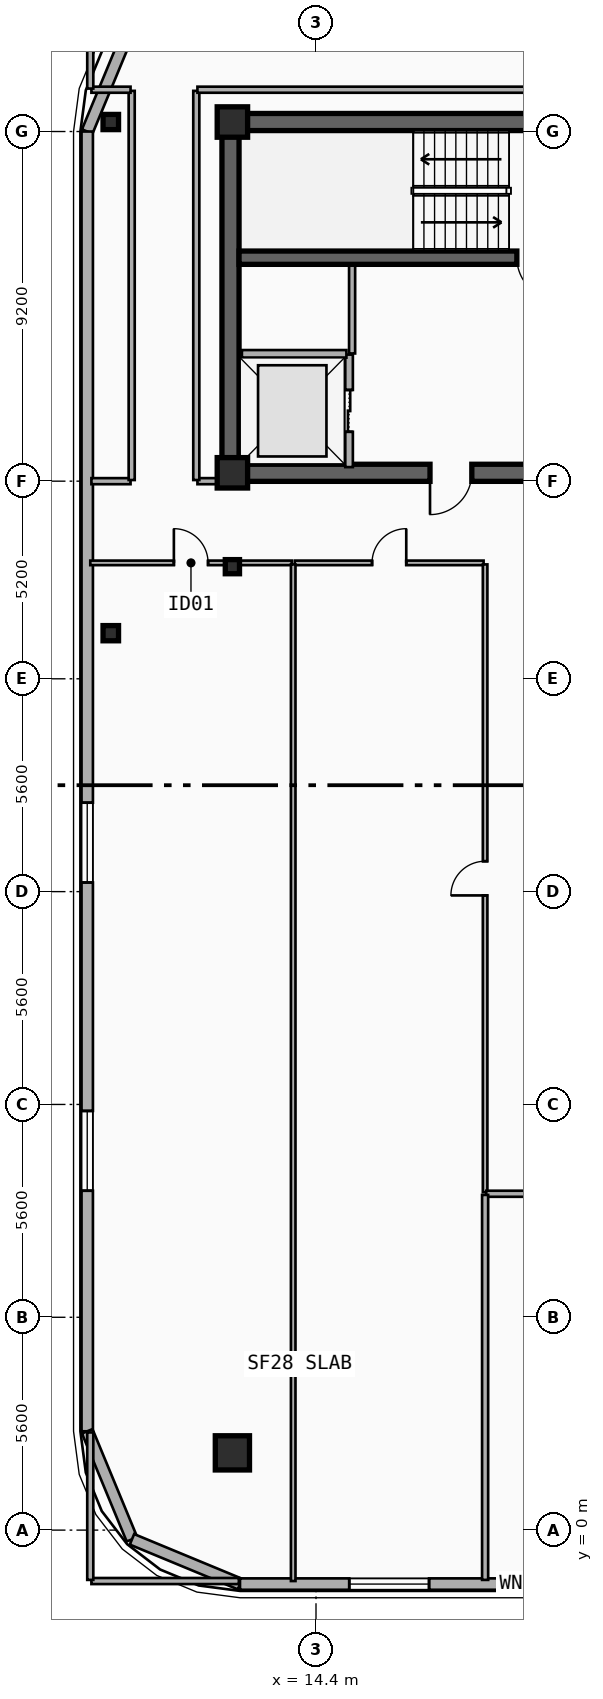
"""IFC4 building model, lengths in metres.
Left out: names, types, materials, properties, quantities, classifications, styles, units other than length and angle.
Written with IfcOpenShell. Run it as: python <this file> out.ifc"""

import sys

from ifc_helpers import new_model, si_unit, direction, frame, frame_2d, origin, origin_2d, place, context, subcontext, project, spatial, rectangle, i_section, extrude, element, fill, save


model = new_model("IFC4")
c1 = context("Model", 3, precision=1e-05, world=origin(), true_north=direction((0.0, 1.0)))
c2 = subcontext(c1, "Body", "Model", "MODEL_VIEW")
j1 = project(units=[si_unit("LENGTHUNIT", "METRE"), si_unit("PLANEANGLEUNIT", "RADIAN")], contexts=[c1])
p1 = place(None, origin())
s1 = spatial("IfcSite", under=j1, at=p1, CompositionType="ELEMENT")
p2 = place(p1, origin())
s2 = spatial("IfcBuilding", under=s1, at=p2, CompositionType="ELEMENT")
p3 = place(p2, frame((0.0, 0.0, 265.8)))
s3 = spatial("IfcBuildingStorey", under=s2, at=p3, CompositionType="ELEMENT", Elevation=265.8)
p4 = place(p3, frame((12.15, 37.05, 0.0), z_axis=(0.0, 0.0, 1.0), x_axis=(1.0, 0.0, 0.0)))
e1 = element("IfcWall", 1, at=p4, inside=s3, PredefinedType="SHEAR", context=c2, shape_type="SweptSolid", body=[
    extrude(rectangle(XDim=33.23, YDim=0.45, at=frame_2d((16.615, 0.0))), origin(), (0.0, 0.0, 1.0), 3.7),
])
p5 = place(p3, frame((21.18, 27.82, 0.0), z_axis=(0.0, 0.0, 1.0), x_axis=(-1.0, 0.0, 0.0)))
e2 = element("IfcWall", 2, at=p5, inside=s3, PredefinedType="SHEAR", context=c2, shape_type="SweptSolid", body=[
    extrude(rectangle(XDim=9.03, YDim=0.45, at=frame_2d((4.515, 0.0))), origin(), (0.0, 0.0, 1.0), 3.7),
])
p6 = place(p5, frame((2.68, 0.0, 0.0)))
e3 = element("IfcOpeningElement", 3, at=p6, cuts=e2, PredefinedType="OPENING", context=c2, shape_type="SweptSolid", body=[
    extrude(rectangle(XDim=1.1, YDim=2.15, at=frame_2d((0.55, 1.075))), frame((0.0, 0.235, 0.0), z_axis=(0.0, -1.0, 0.0), x_axis=(1.0, 0.0, 0.0)), (0.0, 0.0, 1.0), 0.47),
])
p7 = place(p3, frame((12.15, 28.045, 0.0), z_axis=(0.0, 0.0, 1.0), x_axis=(0.0, 1.0, 0.0)))
e4 = element("IfcWall", 4, at=p7, inside=s3, PredefinedType="SHEAR", context=c2, shape_type="SweptSolid", body=[
    extrude(rectangle(XDim=8.78, YDim=0.45, at=frame_2d((4.39, 0.0))), origin(), (0.0, 0.0, 1.0), 3.7),
])
p8 = place(p3, frame((21.005, 33.48, 0.0), z_axis=(0.0, 0.0, 1.0), x_axis=(-1.0, 0.0, 0.0)))
e5 = element("IfcWall", 5, at=p8, inside=s3, PredefinedType="SHEAR", context=c2, shape_type="SweptSolid", body=[
    extrude(rectangle(XDim=8.63, YDim=0.35, at=frame_2d((4.315, 0.0))), origin(), (0.0, 0.0, 1.0), 3.7),
])
p9 = place(p8, frame((0.22, 0.0, 0.0)))
e6 = element("IfcOpeningElement", 6, at=p9, cuts=e5, PredefinedType="OPENING", context=c2, shape_type="SweptSolid", body=[
    extrude(rectangle(XDim=1.1, YDim=2.15, at=frame_2d((0.55, 1.075))), frame((0.0, 0.185, 0.0), z_axis=(0.0, -1.0, 0.0), x_axis=(1.0, 0.0, 0.0)), (0.0, 0.0, 1.0), 0.37),
])
for number, where, z_axis, x_axis in (
    (7, (12.2, 27.82, 0.0), (0.0, 0.0, 1.0), (1.0, 0.0, 0.0)),
    (8, (12.2, 37.05, 0.0), (0.0, 0.0, 1.0), (1.0, 0.0, 0.0)),
):
    element("IfcColumn", number, at=place(p3, frame(where, z_axis=z_axis, x_axis=x_axis)), inside=s3, PredefinedType="COLUMN", context=c2, shape_type="SweptSolid", body=[
        extrude(rectangle(XDim=0.8, YDim=0.8, at=origin_2d()), origin(), (0.0, 0.0, 1.0), 3.7),
    ])
p10 = place(p3, frame((12.2, 25.35, 0.0), z_axis=(0.0, 0.0, 1.0), x_axis=(1.0, 0.0, 0.0)))
e9 = element("IfcColumn", 9, at=p10, inside=s3, PredefinedType="COLUMN", context=c2, shape_type="SweptSolid", body=[
    extrude(i_section(OverallWidth=0.374, OverallDepth=0.372, WebThickness=0.017, FlangeThickness=0.027, FilletRadius=0.015, at=origin_2d()), origin(), (0.0, 0.0, 1.0), 3.7),
])
p11 = place(p3, frame((12.2, 2.141, 0.0), z_axis=(0.0, -0.090227632116, 0.995921168769), x_axis=(1.0, 0.0, 0.0)))
e10 = element("IfcColumn", 10, at=p11, inside=s3, PredefinedType="COLUMN", context=c2, shape_type="SweptSolid", body=[
    extrude(rectangle(XDim=0.9, YDim=0.9, at=origin_2d()), origin(), (0.0, 0.0, 1.0), 3.715),
])
for number, where, z_axis, x_axis in (
    (11, (9.0, 23.6, 0.0), (0.0, 0.0, 1.0), (1.0, 0.0, 0.0)),
    (12, (9.0, 37.05, 0.0), (0.0, 0.0, 1.0), (1.0, 0.0, 0.0)),
):
    element("IfcColumn", number, at=place(p3, frame(where, z_axis=z_axis, x_axis=x_axis)), inside=s3, PredefinedType="COLUMN", context=c2, shape_type="SweptSolid", body=[
        extrude(i_section(OverallWidth=0.408, OverallDepth=0.4, WebThickness=0.025, FlangeThickness=0.039, FilletRadius=0.015, at=origin_2d()), origin(), (0.0, 0.0, 1.0), 3.7),
    ])
p12 = place(p3, frame((8.38, 36.8, 0.0), z_axis=(0.0, 0.0, 1.0), x_axis=(0.382704529509, 0.923870793506, 0.0)))
e13 = element("IfcWall", 13, at=p12, inside=s3, PredefinedType="SOLIDWALL", context=c2, shape_type="SweptSolid", body=[
    extrude(rectangle(XDim=3.077, YDim=0.3, at=frame_2d((1.538, 0.0))), origin(), (0.0, 0.0, 1.0), 3.42),
])
p13 = place(p3, frame((8.38, 2.6, 0.0), z_axis=(0.0, 0.0, 1.0), x_axis=(0.0, 1.0, 0.0)))
e14 = element("IfcWall", 14, at=p13, inside=s3, PredefinedType="SOLIDWALL", context=c2, shape_type="SweptSolid", body=[
    extrude(rectangle(XDim=34.2, YDim=0.3, at=frame_2d((17.1, 0.0))), origin(), (0.0, 0.0, 1.0), 3.42),
])
p14 = place(p13, frame((6.33, 0.0, 0.75)))
e15 = element("IfcOpeningElement", 15, at=p14, cuts=e14, PredefinedType="OPENING", context=c2, shape_type="SweptSolid", body=[
    extrude(rectangle(XDim=2.1, YDim=2.1, at=frame_2d((1.05, 1.05))), frame((0.0, 0.16, 0.0), z_axis=(0.0, -1.0, 0.0), x_axis=(1.0, 0.0, 0.0)), (0.0, 0.0, 1.0), 0.32),
])
p15 = place(p13, frame((14.44, 0.0, 0.75)))
e16 = element("IfcOpeningElement", 16, at=p15, cuts=e14, PredefinedType="OPENING", context=c2, shape_type="SweptSolid", body=[
    extrude(rectangle(XDim=2.1, YDim=2.1, at=frame_2d((1.05, 1.05))), frame((0.0, 0.16, 0.0), z_axis=(0.0, -1.0, 0.0), x_axis=(1.0, 0.0, 0.0)), (0.0, 0.0, 1.0), 0.32),
])
p16 = place(p3, frame((9.557, -0.243, 0.0), z_axis=(0.0, 0.0, 1.0), x_axis=(-0.382676475685, 0.923882414032, 0.0)))
e17 = element("IfcWall", 17, at=p16, inside=s3, PredefinedType="SOLIDWALL", context=c2, shape_type="SweptSolid", body=[
    extrude(rectangle(XDim=3.077, YDim=0.3, at=frame_2d((1.539, 0.0))), origin(), (0.0, 0.0, 1.0), 3.42),
])
p17 = place(p3, frame((12.4, -1.42, 0.0), z_axis=(0.0, 0.0, 1.0), x_axis=(-0.92389884758, 0.382636798336, 0.0)))
e18 = element("IfcWall", 18, at=p17, inside=s3, PredefinedType="SOLIDWALL", context=c2, shape_type="SweptSolid", body=[
    extrude(rectangle(XDim=3.077, YDim=0.3, at=frame_2d((1.538, 0.0))), origin(), (0.0, 0.0, 1.0), 3.42),
])
p18 = place(p3, frame((45.2, -1.42, 0.0), z_axis=(0.0, 0.0, 1.0), x_axis=(-1.0, 0.0, 0.0)))
e19 = element("IfcWall", 19, at=p18, inside=s3, PredefinedType="SOLIDWALL", context=c2, shape_type="SweptSolid", body=[
    extrude(rectangle(XDim=32.8, YDim=0.3, at=frame_2d((16.4, 0.0))), origin(), (0.0, 0.0, 1.0), 3.42),
])
p19 = place(p18, frame((27.825, 0.0, 0.75)))
e20 = element("IfcOpeningElement", 20, at=p19, cuts=e19, PredefinedType="OPENING", context=c2, shape_type="SweptSolid", body=[
    extrude(rectangle(XDim=2.1, YDim=2.1, at=frame_2d((1.05, 1.05))), frame((0.0, 0.16, 0.0), z_axis=(0.0, -1.0, 0.0), x_axis=(1.0, 0.0, 0.0)), (0.0, 0.0, 1.0), 0.32),
])
p20 = place(p18, frame((20.136, 0.0, 0.75)))
e21 = element("IfcOpeningElement", 21, at=p20, cuts=e19, PredefinedType="OPENING", context=c2, shape_type="SweptSolid", body=[
    extrude(rectangle(XDim=2.1, YDim=2.1, at=frame_2d((1.05, 1.05))), frame((0.0, 0.16, 0.0), z_axis=(0.0, -1.0, 0.0), x_axis=(1.0, 0.0, 0.0)), (0.0, 0.0, 1.0), 0.32),
])
p21 = place(p18, frame((23.163, 0.0, 0.68)))
e22 = element("IfcOpeningElement", 22, at=p21, cuts=e19, PredefinedType="OPENING", context=c2, shape_type="SweptSolid", body=[
    extrude(rectangle(XDim=1.2, YDim=1.5, at=frame_2d((0.6, 0.75))), frame((0.0, 0.16, 0.0), z_axis=(0.0, -1.0, 0.0), x_axis=(1.0, 0.0, 0.0)), (0.0, 0.0, 1.0), 0.32),
])
p22 = place(p18, frame((16.831, 0.0, 0.75)))
e23 = element("IfcOpeningElement", 23, at=p22, cuts=e19, PredefinedType="OPENING", context=c2, shape_type="SweptSolid", body=[
    extrude(rectangle(XDim=2.1, YDim=2.1, at=frame_2d((1.05, 1.05))), frame((0.0, 0.16, 0.0), z_axis=(0.0, -1.0, 0.0), x_axis=(1.0, 0.0, 0.0)), (0.0, 0.0, 1.0), 0.32),
])
p23 = place(p18, frame((9.519, 0.0, 0.75)))
e24 = element("IfcOpeningElement", 24, at=p23, cuts=e19, PredefinedType="OPENING", context=c2, shape_type="SweptSolid", body=[
    extrude(rectangle(XDim=2.1, YDim=2.1, at=frame_2d((1.05, 1.05))), frame((0.0, 0.16, 0.0), z_axis=(0.0, -1.0, 0.0), x_axis=(1.0, 0.0, 0.0)), (0.0, 0.0, 1.0), 0.32),
])
p24 = place(p18, frame((13.176, 0.0, 0.75)))
e25 = element("IfcOpeningElement", 25, at=p24, cuts=e19, PredefinedType="OPENING", context=c2, shape_type="SweptSolid", body=[
    extrude(rectangle(XDim=2.1, YDim=2.1, at=frame_2d((1.05, 1.05))), frame((0.0, 0.16, 0.0), z_axis=(0.0, -1.0, 0.0), x_axis=(1.0, 0.0, 0.0)), (0.0, 0.0, 1.0), 0.32),
])
p25 = place(p18, frame((2.875, 0.0, 0.75)))
e26 = element("IfcOpeningElement", 26, at=p25, cuts=e19, PredefinedType="OPENING", context=c2, shape_type="SweptSolid", body=[
    extrude(rectangle(XDim=2.1, YDim=2.1, at=frame_2d((1.05, 1.05))), frame((0.0, 0.16, 0.0), z_axis=(0.0, -1.0, 0.0), x_axis=(1.0, 0.0, 0.0)), (0.0, 0.0, 1.0), 0.32),
])
p26 = place(p3, frame((15.27, 27.97, 0.0), z_axis=(0.0, 0.0, 1.0), x_axis=(0.0, 1.0, 0.0)))
e27 = element("IfcWall", 27, at=p26, inside=s3, PredefinedType="PARTITIONING", context=c2, shape_type="SweptSolid", body=[
    extrude(rectangle(XDim=2.96, YDim=0.2, at=frame_2d((1.48, 0.0))), origin(), (0.0, 0.0, 1.0), 2.49),
])
p27 = place(p26, frame((0.93, 0.0, 0.0)))
e28 = element("IfcOpeningElement", 28, at=p27, cuts=e27, PredefinedType="OPENING", context=c2, shape_type="SweptSolid", body=[
    extrude(rectangle(XDim=1.1, YDim=2.15, at=frame_2d((0.55, 1.075))), frame((0.0, 0.11, 0.0), z_axis=(0.0, -1.0, 0.0), x_axis=(1.0, 0.0, 0.0)), (0.0, 0.0, 1.0), 0.22),
])
p28 = place(p3, frame((12.45, 30.95, 0.0), z_axis=(0.0, 0.0, 1.0), x_axis=(1.0, 0.0, 0.0)))
e29 = element("IfcWall", 29, at=p28, inside=s3, PredefinedType="PARTITIONING", context=c2, shape_type="SweptSolid", body=[
    extrude(rectangle(XDim=2.75, YDim=0.2, at=frame_2d((1.375, 0.0))), origin(), (0.0, 0.0, 1.0), 2.49),
])
p29 = place(p3, frame((8.46, 25.45, 0.0), z_axis=(0.0, 0.0, 1.0), x_axis=(1.0, 0.0, 0.0)))
e30 = element("IfcWall", 30, at=p29, inside=s3, PredefinedType="PARTITIONING", context=c2, shape_type="SweptSolid", body=[
    extrude(rectangle(XDim=5.3, YDim=0.12, at=frame_2d((2.65, 0.0))), origin(), (0.0, 0.0, 1.0), 2.7),
])
p30 = place(p29, frame((2.2, 0.0, 0.0)))
e31 = element("IfcOpeningElement", 31, at=p30, cuts=e30, PredefinedType="OPENING", context=c2, shape_type="SweptSolid", body=[
    extrude(rectangle(XDim=0.9, YDim=2.1, at=frame_2d((0.45, 1.05))), frame((0.0, 0.07, 0.0), z_axis=(0.0, -1.0, 0.0), x_axis=(1.0, 0.0, 0.0)), (0.0, 0.0, 1.0), 0.14),
])
p31 = place(p3, frame((13.84, 25.45, 0.0), z_axis=(0.0, 0.0, 1.0), x_axis=(1.0, 0.0, 0.0)))
e32 = element("IfcWall", 32, at=p31, inside=s3, PredefinedType="PARTITIONING", context=c2, shape_type="SweptSolid", body=[
    extrude(rectangle(XDim=4.97, YDim=0.12, at=frame_2d((2.485, 0.0))), origin(), (0.0, 0.0, 1.0), 3.42),
])
p32 = place(p31, frame((2.035, 0.0, 0.0)))
e33 = element("IfcOpeningElement", 33, at=p32, cuts=e32, PredefinedType="OPENING", context=c2, shape_type="SweptSolid", body=[
    extrude(rectangle(XDim=0.9, YDim=2.1, at=frame_2d((0.45, 1.05))), frame((0.0, 0.07, 0.0), z_axis=(0.0, -1.0, 0.0), x_axis=(1.0, 0.0, 0.0)), (0.0, 0.0, 1.0), 0.14),
])
p33 = place(p3, frame((18.85, 8.89, 0.0), z_axis=(0.0, 0.0, 1.0), x_axis=(0.0, 1.0, 0.0)))
e34 = element("IfcWall", 34, at=p33, inside=s3, PredefinedType="PARTITIONING", context=c2, shape_type="SweptSolid", body=[
    extrude(rectangle(XDim=16.52, YDim=0.12, at=frame_2d((8.26, 0.0))), origin(), (0.0, 0.0, 1.0), 2.91),
])
p34 = place(p33, frame((7.81, 0.0, 0.0)))
e35 = element("IfcOpeningElement", 35, at=p34, cuts=e34, PredefinedType="OPENING", context=c2, shape_type="SweptSolid", body=[
    extrude(rectangle(XDim=0.9, YDim=2.1, at=frame_2d((0.45, 1.05))), frame((0.0, 0.07, 0.0), z_axis=(0.0, -1.0, 0.0), x_axis=(1.0, 0.0, 0.0)), (0.0, 0.0, 1.0), 0.14),
])
p35 = place(p3, frame((13.8, -1.34, 0.0), z_axis=(0.0, 0.0, 1.0), x_axis=(0.0, 1.0, 0.0)))
e36 = element("IfcWall", 36, at=p35, inside=s3, PredefinedType="PARTITIONING", context=c2, shape_type="SweptSolid", body=[
    extrude(rectangle(XDim=26.75, YDim=0.12, at=frame_2d((13.375, 0.0))), origin(), (0.0, 0.0, 1.0), 2.91),
])
p36 = place(p3, frame((15.35, 30.96, 0.0), z_axis=(0.0, 0.0, 1.0), x_axis=(0.0, 1.0, 0.0)))
e37 = element("IfcWall", 37, at=p36, inside=s3, PredefinedType="PARTITIONING", context=c2, shape_type="SweptSolid", body=[
    extrude(rectangle(XDim=2.31, YDim=0.16, at=frame_2d((1.155, 0.0))), origin(), (0.0, 0.0, 1.0), 3.42),
])
p37 = place(p3, frame((8.49, 27.6, 0.0), z_axis=(0.0, 0.0, 1.0), x_axis=(1.0, 0.0, 0.0)))
e38 = element("IfcWall", 38, at=p37, inside=s3, PredefinedType="PARTITIONING", context=c2, shape_type="SweptSolid", body=[
    extrude(rectangle(XDim=1.03, YDim=0.16, at=frame_2d((0.515, 0.0))), origin(), (0.0, 0.0, 1.0), 3.42),
])
p38 = place(p3, frame((11.28, 27.6, 0.0), z_axis=(0.0, 0.0, 1.0), x_axis=(1.0, 0.0, 0.0)))
e39 = element("IfcWall", 39, at=p38, inside=s3, PredefinedType="PARTITIONING", context=c2, shape_type="SweptSolid", body=[
    extrude(rectangle(XDim=0.84, YDim=0.16, at=frame_2d((0.42, 0.0))), origin(), (0.0, 0.0, 1.0), 2.49),
])
p39 = place(p3, frame((18.88, 8.85, 0.0), z_axis=(0.0, 0.0, 1.0), x_axis=(1.0, 0.0, 0.0)))
e40 = element("IfcWall", 40, at=p39, inside=s3, PredefinedType="PARTITIONING", context=c2, shape_type="SweptSolid", body=[
    extrude(rectangle(XDim=1.54, YDim=0.16, at=frame_2d((0.77, 0.0))), origin(), (0.0, 0.0, 1.0), 3.42),
])
for number, where, z_axis, x_axis in (
    (41, (9.55, 27.63, 0.0), (0.0, 0.0, 1.0), (0.0, 1.0, 0.0)),
    (42, (11.25, 27.63, 0.0), (0.0, 0.0, 1.0), (0.0, 1.0, 0.0)),
):
    element("IfcWall", number, at=place(p3, frame(where, z_axis=z_axis, x_axis=x_axis)), inside=s3, PredefinedType="PARTITIONING", context=c2, shape_type="SweptSolid", body=[
        extrude(rectangle(XDim=10.24, YDim=0.16, at=frame_2d((5.12, 0.0))), origin(), (0.0, 0.0, 1.0), 2.9),
    ])
p40 = place(p3, frame((8.49, 37.9, 0.0), z_axis=(0.0, 0.0, 1.0), x_axis=(1.0, 0.0, 0.0)))
e43 = element("IfcWall", 43, at=p40, inside=s3, PredefinedType="PARTITIONING", context=c2, shape_type="SweptSolid", body=[
    extrude(rectangle(XDim=1.03, YDim=0.16, at=frame_2d((0.515, 0.0))), origin(), (0.0, 0.0, 1.0), 3.42),
])
p41 = place(p3, frame((11.28, 37.9, 0.0), z_axis=(0.0, 0.0, 1.0), x_axis=(1.0, 0.0, 0.0)))
e44 = element("IfcWall", 44, at=p41, inside=s3, PredefinedType="PARTITIONING", context=c2, shape_type="SweptSolid", body=[
    extrude(rectangle(XDim=35.04, YDim=0.16, at=frame_2d((17.52, 0.0))), origin(), (0.0, 0.0, 1.0), 3.42),
])
p42 = place(p3, frame((8.46, 37.93, 0.0), z_axis=(0.0, 0.0, 1.0), x_axis=(0.0, 1.0, 0.0)))
e45 = element("IfcWall", 45, at=p42, inside=s3, PredefinedType="PARTITIONING", context=c2, shape_type="SweptSolid", body=[
    extrude(rectangle(XDim=1.44, YDim=0.16, at=frame_2d((0.72, 0.0))), origin(), (0.0, 0.0, 1.0), 3.42),
])
for number, where, z_axis, x_axis in (
    (46, (8.49, -1.34, 0.0), (0.0, 0.0, 1.0), (1.0, 0.0, 0.0)),
    (47, (8.46, -1.31, 0.0), (0.0, 0.0, 1.0), (0.0, 1.0, 0.0)),
):
    element("IfcWall", number, at=place(p3, frame(where, z_axis=z_axis, x_axis=x_axis)), inside=s3, PredefinedType="PARTITIONING", context=c2, shape_type="SweptSolid", body=[
        extrude(rectangle(XDim=3.88, YDim=0.16, at=frame_2d((1.94, 0.0))), origin(), (0.0, 0.0, 1.0), 3.42),
    ])
p43 = place(p3, frame((18.85, -1.31, 0.0), z_axis=(0.0, 0.0, 1.0), x_axis=(0.0, 1.0, 0.0)))
e48 = element("IfcWall", 48, at=p43, inside=s3, PredefinedType="PARTITIONING", context=c2, shape_type="SweptSolid", body=[
    extrude(rectangle(XDim=10.13, YDim=0.16, at=frame_2d((5.065, 0.0))), origin(), (0.0, 0.0, 1.0), 2.91),
])
p44 = place(p14, origin())
e49 = element("IfcWindow", 49, at=p44, inside=s3, PartitioningType="SINGLE_PANEL", PredefinedType="WINDOW", context=c2, shape_type="SweptSolid", body=[
    extrude(rectangle(XDim=2.1, YDim=2.1, at=frame_2d((1.05, 1.05))), frame((0.0, 0.03, 0.0), z_axis=(0.0, -1.0, 0.0), x_axis=(1.0, 0.0, 0.0)), (0.0, 0.0, 1.0), 0.06),
])
fill(e15, e49)
p45 = place(p15, origin())
e50 = element("IfcWindow", 50, at=p45, inside=s3, PartitioningType="SINGLE_PANEL", PredefinedType="WINDOW", context=c2, shape_type="SweptSolid", body=[
    extrude(rectangle(XDim=2.1, YDim=2.1, at=frame_2d((1.05, 1.05))), frame((0.0, 0.03, 0.0), z_axis=(0.0, -1.0, 0.0), x_axis=(1.0, 0.0, 0.0)), (0.0, 0.0, 1.0), 0.06),
])
fill(e16, e50)
p46 = place(p19, origin())
e51 = element("IfcWindow", 51, at=p46, inside=s3, PartitioningType="SINGLE_PANEL", PredefinedType="WINDOW", context=c2, shape_type="SweptSolid", body=[
    extrude(rectangle(XDim=2.1, YDim=2.1, at=frame_2d((1.05, 1.05))), frame((0.0, 0.03, 0.0), z_axis=(0.0, -1.0, 0.0), x_axis=(1.0, 0.0, 0.0)), (0.0, 0.0, 1.0), 0.06),
])
fill(e20, e51)
p47 = place(p27, origin())
e52 = element("IfcDoor", 52, at=p47, inside=s3, OperationType="DOUBLE_DOOR_SLIDING", PredefinedType="DOOR", context=c2, shape_type="SweptSolid", body=[
    extrude(rectangle(XDim=1.1, YDim=2.15, at=frame_2d((0.55, 1.075))), frame((0.0, 0.025, 0.0), z_axis=(0.0, -1.0, 0.0), x_axis=(1.0, 0.0, 0.0)), (0.0, 0.0, 1.0), 0.05),
])
fill(e28, e52)
p48 = place(p9, origin())
e53 = element("IfcDoor", 53, at=p48, inside=s3, OperationType="SINGLE_SWING_LEFT", PredefinedType="DOOR", context=c2, shape_type="SweptSolid", body=[
    extrude(rectangle(XDim=1.1, YDim=2.15, at=frame_2d((0.55, 1.075))), frame((0.0, 0.025, 0.0), z_axis=(0.0, -1.0, 0.0), x_axis=(1.0, 0.0, 0.0)), (0.0, 0.0, 1.0), 0.05),
])
fill(e6, e53)
p49 = place(p6, origin())
e54 = element("IfcDoor", 54, at=p49, inside=s3, OperationType="SINGLE_SWING_RIGHT", PredefinedType="DOOR", context=c2, shape_type="SweptSolid", body=[
    extrude(rectangle(XDim=1.1, YDim=2.15, at=frame_2d((0.55, 1.075))), frame((0.0, 0.025, 0.0), z_axis=(0.0, -1.0, 0.0), x_axis=(1.0, 0.0, 0.0)), (0.0, 0.0, 1.0), 0.05),
])
fill(e3, e54)
p50 = place(p30, origin())
e55 = element("IfcDoor", 55, at=p50, inside=s3, OperationType="SINGLE_SWING_LEFT", PredefinedType="DOOR", context=c2, shape_type="SweptSolid", body=[
    extrude(rectangle(XDim=0.9, YDim=2.1, at=frame_2d((0.45, 1.05))), frame((0.0, 0.025, 0.0), z_axis=(0.0, -1.0, 0.0), x_axis=(1.0, 0.0, 0.0)), (0.0, 0.0, 1.0), 0.05),
])
fill(e31, e55)
p51 = place(p32, origin())
e56 = element("IfcDoor", 56, at=p51, inside=s3, OperationType="SINGLE_SWING_RIGHT", PredefinedType="DOOR", context=c2, shape_type="SweptSolid", body=[
    extrude(rectangle(XDim=0.9, YDim=2.1, at=frame_2d((0.45, 1.05))), frame((0.0, 0.025, 0.0), z_axis=(0.0, -1.0, 0.0), x_axis=(1.0, 0.0, 0.0)), (0.0, 0.0, 1.0), 0.05),
])
fill(e33, e56)
p52 = place(p34, origin())
e57 = element("IfcDoor", 57, at=p52, inside=s3, OperationType="SINGLE_SWING_LEFT", PredefinedType="DOOR", context=c2, shape_type="SweptSolid", body=[
    extrude(rectangle(XDim=0.9, YDim=2.1, at=frame_2d((0.45, 1.05))), frame((0.0, 0.025, 0.0), z_axis=(0.0, -1.0, 0.0), x_axis=(1.0, 0.0, 0.0)), (0.0, 0.0, 1.0), 0.05),
])
fill(e35, e57)
save(model, sys.argv[1])
